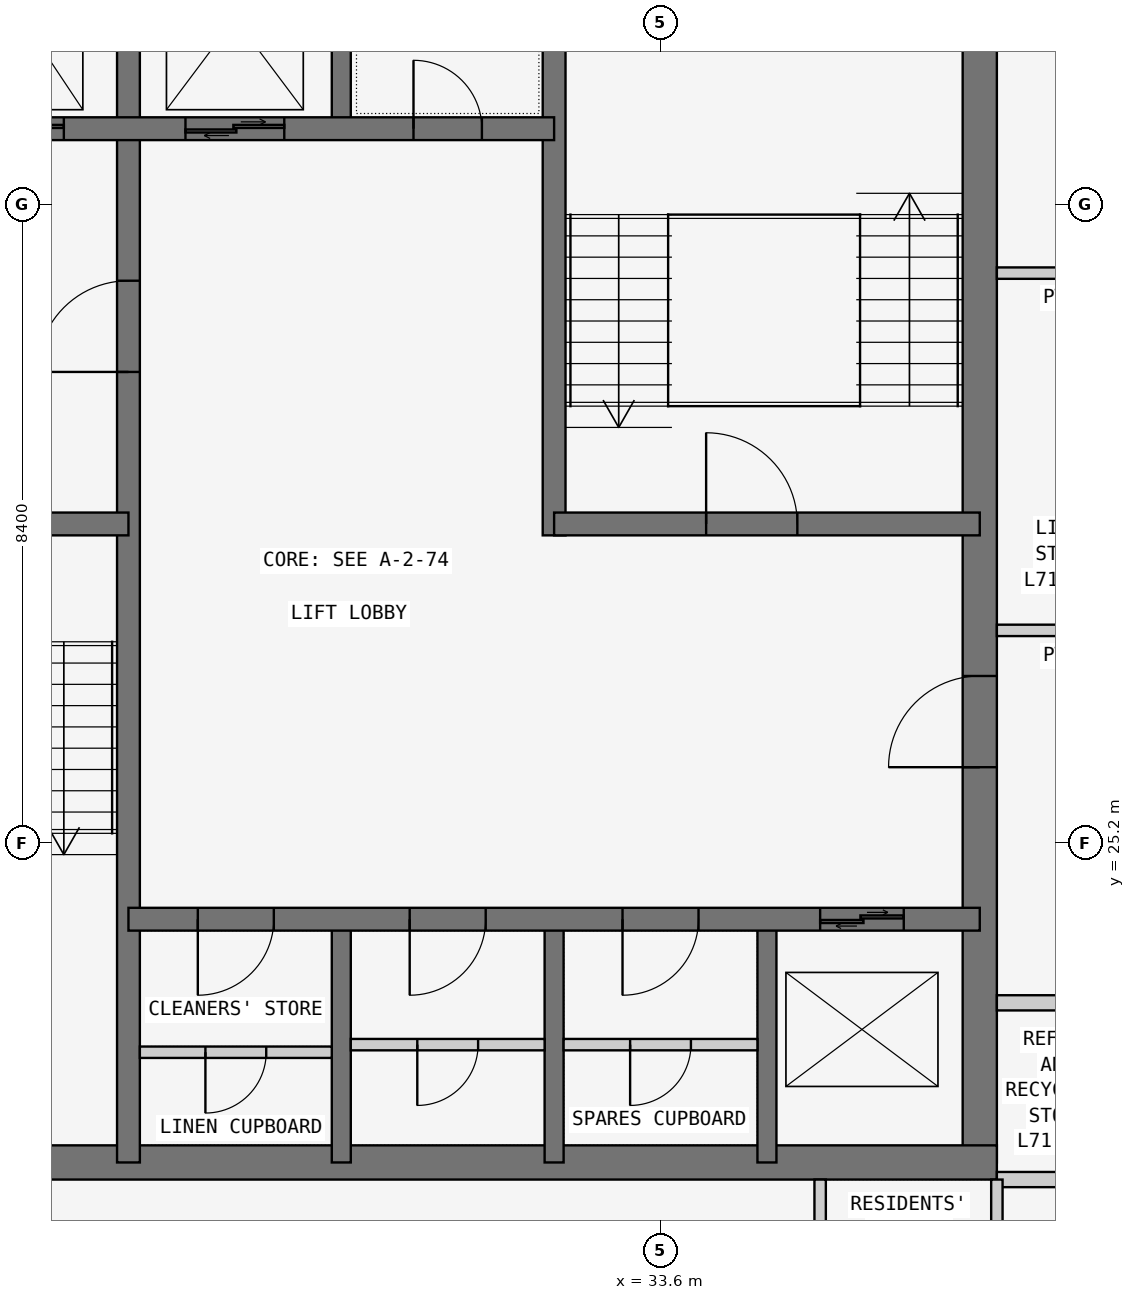
"""IFC4 building model, lengths in metres.
Left out: names, types, materials, properties, quantities, classifications, styles, units other than length and angle.
Written with IfcOpenShell. Run it as: python <this file> out.ifc"""

import sys

from ifc_helpers import new_model, si_unit, direction, frame, frame_2d, origin, place, context, subcontext, project, spatial, rectangle, extrude, element, fill, save


model = new_model("IFC4")
c1 = context("Model", 3, precision=1e-05, world=origin(), true_north=direction((0.0, 1.0)))
c2 = subcontext(c1, "Body", "Model", "MODEL_VIEW")
j1 = project(units=[si_unit("LENGTHUNIT", "METRE"), si_unit("PLANEANGLEUNIT", "RADIAN")], contexts=[c1])
p1 = place(None, origin())
s1 = spatial("IfcSite", under=j1, at=p1, CompositionType="ELEMENT")
p2 = place(p1, origin())
s2 = spatial("IfcBuilding", under=s1, at=p2, CompositionType="ELEMENT")
p3 = place(p2, frame((0.0, 0.0, 272.1)))
s3 = spatial("IfcBuildingStorey", under=s2, at=p3, CompositionType="ELEMENT", Elevation=272.1)
p4 = place(p3, frame((21.0, 21.0, 0.0), z_axis=(0.0, 0.0, 1.0), x_axis=(1.0, 0.0, 0.0)))
e1 = element("IfcWall", 1, at=p4, inside=s3, PredefinedType="SHEAR", context=c2, shape_type="SweptSolid", body=[
    extrude(rectangle(XDim=17.025, YDim=0.45, at=frame_2d((8.512, 0.0))), origin(), (0.0, 0.0, 1.0), 3.6),
])
p5 = place(p3, frame((37.8, 21.0, 0.0), z_axis=(0.0, 0.0, 1.0), x_axis=(0.0, 1.0, 0.0)))
e2 = element("IfcWall", 2, at=p5, inside=s3, PredefinedType="SHEAR", context=c2, shape_type="SweptSolid", body=[
    extrude(rectangle(XDim=17.025, YDim=0.45, at=frame_2d((8.512, 0.0))), origin(), (0.0, 0.0, 1.0), 3.6),
])
p6 = place(p5, frame((5.2, 0.0, 0.0)))
e3 = element("IfcOpeningElement", 3, at=p6, cuts=e2, PredefinedType="OPENING", context=c2, shape_type="SweptSolid", body=[
    extrude(rectangle(XDim=1.2, YDim=2.1, at=frame_2d((0.6, 1.05))), frame((0.0, 0.235, 0.0), z_axis=(0.0, -1.0, 0.0), x_axis=(1.0, 0.0, 0.0)), (0.0, 0.0, 1.0), 0.47),
])
p7 = place(p3, frame((26.6, 21.0, 0.0), z_axis=(0.0, 0.0, 1.0), x_axis=(0.0, 1.0, 0.0)))
e4 = element("IfcWall", 4, at=p7, inside=s3, PredefinedType="SHEAR", context=c2, shape_type="SweptSolid", body=[
    extrude(rectangle(XDim=16.8, YDim=0.3, at=frame_2d((8.4, 0.0))), origin(), (0.0, 0.0, 1.0), 3.6),
])
p8 = place(p7, frame((10.4, 0.0, 0.0)))
e5 = element("IfcOpeningElement", 5, at=p8, cuts=e4, PredefinedType="OPENING", context=c2, shape_type="SweptSolid", body=[
    extrude(rectangle(XDim=1.2, YDim=2.1, at=frame_2d((0.6, 1.05))), frame((0.0, 0.16, 0.0), z_axis=(0.0, -1.0, 0.0), x_axis=(1.0, 0.0, 0.0)), (0.0, 0.0, 1.0), 0.32),
])
p9 = place(p3, frame((21.0, 29.4, 0.0), z_axis=(0.0, 0.0, 1.0), x_axis=(1.0, 0.0, 0.0)))
e6 = element("IfcWall", 6, at=p9, inside=s3, PredefinedType="SHEAR", context=c2, shape_type="SweptSolid", body=[
    extrude(rectangle(XDim=5.6, YDim=0.3, at=frame_2d((2.8, 0.0))), origin(), (0.0, 0.0, 1.0), 3.6),
])
p10 = place(p9, frame((2.3, 0.0, 0.0)))
e7 = element("IfcOpeningElement", 7, at=p10, cuts=e6, PredefinedType="OPENING", context=c2, shape_type="SweptSolid", body=[
    extrude(rectangle(XDim=1.2, YDim=2.1, at=frame_2d((0.6, 1.05))), frame((0.0, 0.16, 0.0), z_axis=(0.0, -1.0, 0.0), x_axis=(1.0, 0.0, 0.0)), (0.0, 0.0, 1.0), 0.32),
])
p11 = place(p3, frame((21.0, 34.6, 0.0), z_axis=(0.0, 0.0, 1.0), x_axis=(1.0, 0.0, 0.0)))
e8 = element("IfcWall", 8, at=p11, inside=s3, PredefinedType="SHEAR", context=c2, shape_type="SweptSolid", body=[
    extrude(rectangle(XDim=11.2, YDim=0.3, at=frame_2d((5.6, 0.0))), origin(), (0.0, 0.0, 1.0), 3.6),
])
p12 = place(p11, frame((9.35, 0.0, 0.0)))
e9 = element("IfcOpeningElement", 9, at=p12, cuts=e8, PredefinedType="OPENING", context=c2, shape_type="SweptSolid", body=[
    extrude(rectangle(XDim=0.9, YDim=2.1, at=frame_2d((0.45, 1.05))), frame((0.0, 0.16, 0.0), z_axis=(0.0, -1.0, 0.0), x_axis=(1.0, 0.0, 0.0)), (0.0, 0.0, 1.0), 0.32),
])
p13 = place(p11, frame((1.0, 0.0, 0.0)))
e10 = element("IfcOpeningElement", 10, at=p13, cuts=e8, PredefinedType="OPENING", context=c2, shape_type="SweptSolid", body=[
    extrude(rectangle(XDim=1.1, YDim=2.1, at=frame_2d((0.55, 1.05))), frame((0.0, 0.16, 0.0), z_axis=(0.0, -1.0, 0.0), x_axis=(1.0, 0.0, 0.0)), (0.0, 0.0, 1.0), 0.32),
])
p14 = place(p11, frame((3.65, 0.0, 0.0)))
e11 = element("IfcOpeningElement", 11, at=p14, cuts=e8, PredefinedType="OPENING", context=c2, shape_type="SweptSolid", body=[
    extrude(rectangle(XDim=1.1, YDim=2.1, at=frame_2d((0.55, 1.05))), frame((0.0, 0.16, 0.0), z_axis=(0.0, -1.0, 0.0), x_axis=(1.0, 0.0, 0.0)), (0.0, 0.0, 1.0), 0.32),
])
p15 = place(p11, frame((6.35, 0.0, 0.0)))
e12 = element("IfcOpeningElement", 12, at=p15, cuts=e8, PredefinedType="OPENING", context=c2, shape_type="SweptSolid", body=[
    extrude(rectangle(XDim=1.3, YDim=2.1, at=frame_2d((0.65, 1.05))), frame((0.0, 0.16, 0.0), z_axis=(0.0, -1.0, 0.0), x_axis=(1.0, 0.0, 0.0)), (0.0, 0.0, 1.0), 0.32),
])
p16 = place(p3, frame((26.6, 24.2, 0.0), z_axis=(0.0, 0.0, 1.0), x_axis=(1.0, 0.0, 0.0)))
e13 = element("IfcWall", 13, at=p16, inside=s3, PredefinedType="SHEAR", context=c2, shape_type="SweptSolid", body=[
    extrude(rectangle(XDim=11.2, YDim=0.3, at=frame_2d((5.6, 0.0))), origin(), (0.0, 0.0, 1.0), 3.6),
])
p17 = place(p16, frame((0.913, 0.0, 0.0)))
e14 = element("IfcOpeningElement", 14, at=p17, cuts=e13, PredefinedType="OPENING", context=c2, shape_type="SweptSolid", body=[
    extrude(rectangle(XDim=1.0, YDim=2.1, at=frame_2d((0.5, 1.05))), frame((0.0, 0.16, 0.0), z_axis=(0.0, -1.0, 0.0), x_axis=(1.0, 0.0, 0.0)), (0.0, 0.0, 1.0), 0.32),
])
p18 = place(p16, frame((3.7, 0.0, 0.0)))
e15 = element("IfcOpeningElement", 15, at=p18, cuts=e13, PredefinedType="OPENING", context=c2, shape_type="SweptSolid", body=[
    extrude(rectangle(XDim=1.0, YDim=2.1, at=frame_2d((0.5, 1.05))), frame((0.0, 0.16, 0.0), z_axis=(0.0, -1.0, 0.0), x_axis=(1.0, 0.0, 0.0)), (0.0, 0.0, 1.0), 0.32),
])
p19 = place(p16, frame((6.5, 0.0, 0.0)))
e16 = element("IfcOpeningElement", 16, at=p19, cuts=e13, PredefinedType="OPENING", context=c2, shape_type="SweptSolid", body=[
    extrude(rectangle(XDim=1.0, YDim=2.1, at=frame_2d((0.5, 1.05))), frame((0.0, 0.16, 0.0), z_axis=(0.0, -1.0, 0.0), x_axis=(1.0, 0.0, 0.0)), (0.0, 0.0, 1.0), 0.32),
])
p20 = place(p16, frame((9.1, 0.0, 0.0)))
e17 = element("IfcOpeningElement", 17, at=p20, cuts=e13, PredefinedType="OPENING", context=c2, shape_type="SweptSolid", body=[
    extrude(rectangle(XDim=1.1, YDim=2.1, at=frame_2d((0.55, 1.05))), frame((0.0, 0.16, 0.0), z_axis=(0.0, -1.0, 0.0), x_axis=(1.0, 0.0, 0.0)), (0.0, 0.0, 1.0), 0.32),
])
p21 = place(p3, frame((32.2, 29.25, 0.0), z_axis=(0.0, 0.0, 1.0), x_axis=(0.0, 1.0, 0.0)))
e18 = element("IfcWall", 18, at=p21, inside=s3, PredefinedType="SHEAR", context=c2, shape_type="SweptSolid", body=[
    extrude(rectangle(XDim=8.55, YDim=0.3, at=frame_2d((4.275, 0.0))), origin(), (0.0, 0.0, 1.0), 3.6),
])
p22 = place(p3, frame((32.2, 29.4, 0.0), z_axis=(0.0, 0.0, 1.0), x_axis=(1.0, 0.0, 0.0)))
e19 = element("IfcWall", 19, at=p22, inside=s3, PredefinedType="SHEAR", context=c2, shape_type="SweptSolid", body=[
    extrude(rectangle(XDim=5.6, YDim=0.3, at=frame_2d((2.8, 0.0))), origin(), (0.0, 0.0, 1.0), 3.6),
])
p23 = place(p22, frame((2.0, 0.0, 0.0)))
e20 = element("IfcOpeningElement", 20, at=p23, cuts=e19, PredefinedType="OPENING", context=c2, shape_type="SweptSolid", body=[
    extrude(rectangle(XDim=1.2, YDim=2.1, at=frame_2d((0.6, 1.05))), frame((0.0, 0.16, 0.0), z_axis=(0.0, -1.0, 0.0), x_axis=(1.0, 0.0, 0.0)), (0.0, 0.0, 1.0), 0.32),
])
for number, where, z_axis, x_axis in (
    (21, (29.4, 21.0, 0.0), (0.0, 0.0, 1.0), (0.0, 1.0, 0.0)),
    (22, (32.2, 21.0, 0.0), (0.0, 0.0, 1.0), (0.0, 1.0, 0.0)),
    (23, (35.0, 21.0, 0.0), (0.0, 0.0, 1.0), (0.0, 1.0, 0.0)),
    (24, (29.4, 34.6, 0.0), (0.0, 0.0, 1.0), (0.0, 1.0, 0.0)),
):
    element("IfcWall", number, at=place(p3, frame(where, z_axis=z_axis, x_axis=x_axis)), inside=s3, PredefinedType="SHEAR", context=c2, shape_type="SweptSolid", body=[
        extrude(rectangle(XDim=3.2, YDim=0.25, at=frame_2d((1.6, 0.0))), origin(), (0.0, 0.0, 1.0), 3.6),
    ])
for number, where, z_axis, x_axis in (
    (25, (38.025, 20.775, 0.0), (0.0, 0.0, 1.0), (1.0, 0.0, 0.0)),
    (26, (40.6, 23.1, 0.0), (0.0, 0.0, 1.0), (-1.0, 0.0, 0.0)),
):
    element("IfcWall", number, at=place(p3, frame(where, z_axis=z_axis, x_axis=x_axis)), inside=s3, PredefinedType="PARTITIONING", context=c2, shape_type="SweptSolid", body=[
        extrude(rectangle(XDim=2.575, YDim=0.2, at=frame_2d((1.288, 0.0))), origin(), (0.0, 0.0, 1.0), 3.45),
    ])
for number, where, z_axis, x_axis in (
    (27, (38.025, 28.0, 0.0), (0.0, 0.0, 1.0), (1.0, 0.0, 0.0)),
    (28, (39.85, 32.7, 0.0), (0.0, 0.0, 1.0), (-1.0, 0.0, 0.0)),
):
    element("IfcWall", number, at=place(p3, frame(where, z_axis=z_axis, x_axis=x_axis)), inside=s3, PredefinedType="PARTITIONING", context=c2, shape_type="SweptSolid", body=[
        extrude(rectangle(XDim=1.825, YDim=0.15, at=frame_2d((0.913, 0.0))), origin(), (0.0, 0.0, 1.0), 3.45),
    ])
for number, where, z_axis, x_axis in (
    (29, (35.7, 20.775, 0.0), (0.0, 0.0, 1.0), (0.0, -1.0, 0.0)),
    (30, (38.025, 18.2, 0.0), (0.0, 0.0, 1.0), (0.0, 1.0, 0.0)),
):
    element("IfcWall", number, at=place(p3, frame(where, z_axis=z_axis, x_axis=x_axis)), inside=s3, PredefinedType="PARTITIONING", context=c2, shape_type="SweptSolid", body=[
        extrude(rectangle(XDim=2.575, YDim=0.15, at=frame_2d((1.288, 0.0))), origin(), (0.0, 0.0, 1.0), 3.45),
    ])
p24 = place(p3, frame((26.75, 22.45, 0.0), z_axis=(0.0, 0.0, 1.0), x_axis=(1.0, 0.0, 0.0)))
e31 = element("IfcWall", 31, at=p24, inside=s3, PredefinedType="PARTITIONING", context=c2, shape_type="SweptSolid", body=[
    extrude(rectangle(XDim=2.525, YDim=0.15, at=frame_2d((1.262, 0.0))), origin(), (0.0, 0.0, 1.0), 3.45),
])
p25 = place(p24, frame((0.863, 0.0, 0.0)))
e32 = element("IfcOpeningElement", 32, at=p25, cuts=e31, PredefinedType="OPENING", context=c2, shape_type="SweptSolid", body=[
    extrude(rectangle(XDim=0.8, YDim=2.1, at=frame_2d((0.4, 1.05))), frame((0.0, 0.085, 0.0), z_axis=(0.0, -1.0, 0.0), x_axis=(1.0, 0.0, 0.0)), (0.0, 0.0, 1.0), 0.17),
])
p26 = place(p3, frame((29.525, 22.55, 0.0), z_axis=(0.0, 0.0, 1.0), x_axis=(1.0, 0.0, 0.0)))
e33 = element("IfcWall", 33, at=p26, inside=s3, PredefinedType="PARTITIONING", context=c2, shape_type="SweptSolid", body=[
    extrude(rectangle(XDim=2.55, YDim=0.15, at=frame_2d((1.275, 0.0))), origin(), (0.0, 0.0, 1.0), 3.45),
])
p27 = place(p26, frame((0.875, 0.0, 0.0)))
e34 = element("IfcOpeningElement", 34, at=p27, cuts=e33, PredefinedType="OPENING", context=c2, shape_type="SweptSolid", body=[
    extrude(rectangle(XDim=0.8, YDim=2.1, at=frame_2d((0.4, 1.05))), frame((0.0, 0.085, 0.0), z_axis=(0.0, -1.0, 0.0), x_axis=(1.0, 0.0, 0.0)), (0.0, 0.0, 1.0), 0.17),
])
p28 = place(p3, frame((32.325, 22.55, 0.0), z_axis=(0.0, 0.0, 1.0), x_axis=(1.0, 0.0, 0.0)))
e35 = element("IfcWall", 35, at=p28, inside=s3, PredefinedType="PARTITIONING", context=c2, shape_type="SweptSolid", body=[
    extrude(rectangle(XDim=2.55, YDim=0.15, at=frame_2d((1.275, 0.0))), origin(), (0.0, 0.0, 1.0), 3.45),
])
p29 = place(p28, frame((0.875, 0.0, 0.0)))
e36 = element("IfcOpeningElement", 36, at=p29, cuts=e35, PredefinedType="OPENING", context=c2, shape_type="SweptSolid", body=[
    extrude(rectangle(XDim=0.8, YDim=2.1, at=frame_2d((0.4, 1.05))), frame((0.0, 0.085, 0.0), z_axis=(0.0, -1.0, 0.0), x_axis=(1.0, 0.0, 0.0)), (0.0, 0.0, 1.0), 0.17),
])
p30 = place(p8, origin())
e37 = element("IfcDoor", 37, at=p30, inside=s3, OperationType="SINGLE_SWING_LEFT", PredefinedType="DOOR", context=c2, shape_type="SweptSolid", body=[
    extrude(rectangle(XDim=1.2, YDim=2.1, at=frame_2d((0.6, 1.05))), frame((0.0, 0.025, 0.0), z_axis=(0.0, -1.0, 0.0), x_axis=(1.0, 0.0, 0.0)), (0.0, 0.0, 1.0), 0.05),
])
fill(e5, e37)
p31 = place(p6, origin())
e38 = element("IfcDoor", 38, at=p31, inside=s3, OperationType="SINGLE_SWING_LEFT", PredefinedType="DOOR", context=c2, shape_type="SweptSolid", body=[
    extrude(rectangle(XDim=1.2, YDim=2.1, at=frame_2d((0.6, 1.05))), frame((0.0, 0.025, 0.0), z_axis=(0.0, -1.0, 0.0), x_axis=(1.0, 0.0, 0.0)), (0.0, 0.0, 1.0), 0.05),
])
fill(e3, e38)
p32 = place(p23, origin())
e39 = element("IfcDoor", 39, at=p32, inside=s3, OperationType="SINGLE_SWING_LEFT", PredefinedType="DOOR", context=c2, shape_type="SweptSolid", body=[
    extrude(rectangle(XDim=1.2, YDim=2.1, at=frame_2d((0.6, 1.05))), frame((0.0, 0.025, 0.0), z_axis=(0.0, -1.0, 0.0), x_axis=(1.0, 0.0, 0.0)), (0.0, 0.0, 1.0), 0.05),
])
fill(e20, e39)
p33 = place(p12, origin())
e40 = element("IfcDoor", 40, at=p33, inside=s3, OperationType="SINGLE_SWING_LEFT", PredefinedType="DOOR", context=c2, shape_type="SweptSolid", body=[
    extrude(rectangle(XDim=0.9, YDim=2.1, at=frame_2d((0.45, 1.05))), frame((0.0, 0.025, 0.0), z_axis=(0.0, -1.0, 0.0), x_axis=(1.0, 0.0, 0.0)), (0.0, 0.0, 1.0), 0.05),
])
fill(e9, e40)
p34 = place(p17, frame((1.0, 0.0, 0.0), z_axis=(0.0, 0.0, 1.0), x_axis=(-1.0, 0.0, 0.0)))
e41 = element("IfcDoor", 41, at=p34, inside=s3, OperationType="SINGLE_SWING_RIGHT", PredefinedType="DOOR", context=c2, shape_type="SweptSolid", body=[
    extrude(rectangle(XDim=1.0, YDim=2.1, at=frame_2d((0.5, 1.05))), frame((0.0, 0.025, 0.0), z_axis=(0.0, -1.0, 0.0), x_axis=(1.0, 0.0, 0.0)), (0.0, 0.0, 1.0), 0.05),
])
fill(e14, e41)
p35 = place(p25, frame((0.8, 0.0, 0.0), z_axis=(0.0, 0.0, 1.0), x_axis=(-1.0, 0.0, 0.0)))
e42 = element("IfcDoor", 42, at=p35, inside=s3, OperationType="SINGLE_SWING_RIGHT", PredefinedType="DOOR", context=c2, shape_type="SweptSolid", body=[
    extrude(rectangle(XDim=0.8, YDim=2.1, at=frame_2d((0.4, 1.05))), frame((0.0, 0.025, 0.0), z_axis=(0.0, -1.0, 0.0), x_axis=(1.0, 0.0, 0.0)), (0.0, 0.0, 1.0), 0.05),
])
fill(e32, e42)
p36 = place(p18, frame((1.0, 0.0, 0.0), z_axis=(0.0, 0.0, 1.0), x_axis=(-1.0, 0.0, 0.0)))
e43 = element("IfcDoor", 43, at=p36, inside=s3, OperationType="SINGLE_SWING_RIGHT", PredefinedType="DOOR", context=c2, shape_type="SweptSolid", body=[
    extrude(rectangle(XDim=1.0, YDim=2.1, at=frame_2d((0.5, 1.05))), frame((0.0, 0.025, 0.0), z_axis=(0.0, -1.0, 0.0), x_axis=(1.0, 0.0, 0.0)), (0.0, 0.0, 1.0), 0.05),
])
fill(e15, e43)
p37 = place(p27, frame((0.8, 0.0, 0.0), z_axis=(0.0, 0.0, 1.0), x_axis=(-1.0, 0.0, 0.0)))
e44 = element("IfcDoor", 44, at=p37, inside=s3, OperationType="SINGLE_SWING_RIGHT", PredefinedType="DOOR", context=c2, shape_type="SweptSolid", body=[
    extrude(rectangle(XDim=0.8, YDim=2.1, at=frame_2d((0.4, 1.05))), frame((0.0, 0.025, 0.0), z_axis=(0.0, -1.0, 0.0), x_axis=(1.0, 0.0, 0.0)), (0.0, 0.0, 1.0), 0.05),
])
fill(e34, e44)
p38 = place(p19, frame((1.0, 0.0, 0.0), z_axis=(0.0, 0.0, 1.0), x_axis=(-1.0, 0.0, 0.0)))
e45 = element("IfcDoor", 45, at=p38, inside=s3, OperationType="SINGLE_SWING_RIGHT", PredefinedType="DOOR", context=c2, shape_type="SweptSolid", body=[
    extrude(rectangle(XDim=1.0, YDim=2.1, at=frame_2d((0.5, 1.05))), frame((0.0, 0.025, 0.0), z_axis=(0.0, -1.0, 0.0), x_axis=(1.0, 0.0, 0.0)), (0.0, 0.0, 1.0), 0.05),
])
fill(e16, e45)
p39 = place(p29, frame((0.8, 0.0, 0.0), z_axis=(0.0, 0.0, 1.0), x_axis=(-1.0, 0.0, 0.0)))
e46 = element("IfcDoor", 46, at=p39, inside=s3, OperationType="SINGLE_SWING_RIGHT", PredefinedType="DOOR", context=c2, shape_type="SweptSolid", body=[
    extrude(rectangle(XDim=0.8, YDim=2.1, at=frame_2d((0.4, 1.05))), frame((0.0, 0.025, 0.0), z_axis=(0.0, -1.0, 0.0), x_axis=(1.0, 0.0, 0.0)), (0.0, 0.0, 1.0), 0.05),
])
fill(e36, e46)
p40 = place(p20, origin())
e47 = element("IfcDoor", 47, at=p40, inside=s3, OperationType="DOUBLE_DOOR_SLIDING", PredefinedType="DOOR", context=c2, shape_type="SweptSolid", body=[
    extrude(rectangle(XDim=1.1, YDim=2.1, at=frame_2d((0.55, 1.05))), frame((0.0, 0.025, 0.0), z_axis=(0.0, -1.0, 0.0), x_axis=(1.0, 0.0, 0.0)), (0.0, 0.0, 1.0), 0.05),
])
fill(e17, e47)
p41 = place(p14, origin())
e48 = element("IfcDoor", 48, at=p41, inside=s3, OperationType="DOUBLE_DOOR_SLIDING", PredefinedType="DOOR", context=c2, shape_type="SweptSolid", body=[
    extrude(rectangle(XDim=1.1, YDim=2.1, at=frame_2d((0.55, 1.05))), frame((0.0, 0.025, 0.0), z_axis=(0.0, -1.0, 0.0), x_axis=(1.0, 0.0, 0.0)), (0.0, 0.0, 1.0), 0.05),
])
fill(e11, e48)
p42 = place(p15, origin())
e49 = element("IfcDoor", 49, at=p42, inside=s3, OperationType="DOUBLE_DOOR_SLIDING", PredefinedType="DOOR", context=c2, shape_type="SweptSolid", body=[
    extrude(rectangle(XDim=1.3, YDim=2.1, at=frame_2d((0.65, 1.05))), frame((0.0, 0.025, 0.0), z_axis=(0.0, -1.0, 0.0), x_axis=(1.0, 0.0, 0.0)), (0.0, 0.0, 1.0), 0.05),
])
fill(e12, e49)
save(model, sys.argv[1])
